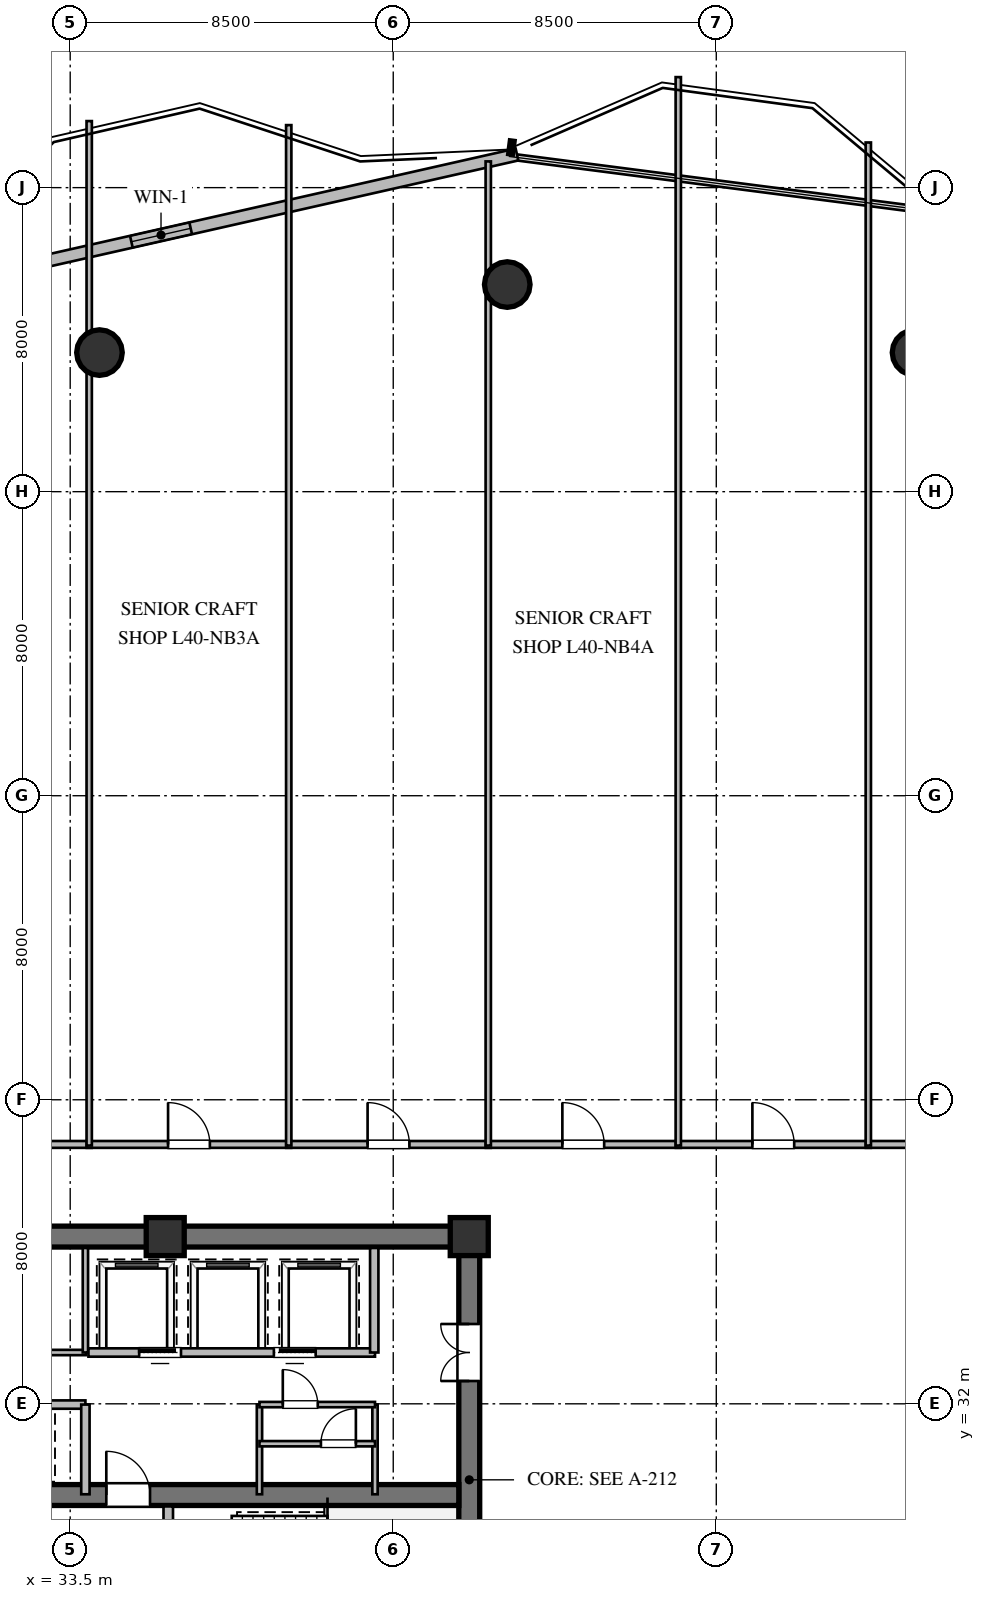
"""IFC4 building model, lengths in metres.
Left out: names, types, materials, properties, quantities, classifications, styles, units other than length and angle.
Written with IfcOpenShell. Run it as: python <this file> out.ifc"""

import sys

from ifc_helpers import new_model, si_unit, direction, frame, frame_2d, origin, origin_2d, place, context, subcontext, project, spatial, rectangle, circle, extrude, element, fill, save


model = new_model("IFC4")
c1 = context("Model", 3, precision=1e-05, world=origin(), true_north=direction((0.0, 1.0)))
c2 = subcontext(c1, "Body", "Model", "MODEL_VIEW")
j1 = project(units=[si_unit("LENGTHUNIT", "METRE"), si_unit("PLANEANGLEUNIT", "RADIAN")], contexts=[c1])
p1 = place(None, origin())
s1 = spatial("IfcSite", under=j1, at=p1, CompositionType="ELEMENT")
p2 = place(p1, origin())
s2 = spatial("IfcBuilding", under=s1, at=p2, CompositionType="ELEMENT")
p3 = place(p2, frame((0.0, 0.0, 153.0)))
s3 = spatial("IfcBuildingStorey", under=s2, at=p3, CompositionType="ELEMENT", Elevation=153.0)
p4 = place(p3, frame((21.725, 36.4, 0.0), z_axis=(0.0, 0.0, 1.0), x_axis=(1.0, 0.0, 0.0)))
e1 = element("IfcWall", 1, at=p4, inside=s3, PredefinedType="SHEAR", context=c2, shape_type="SweptSolid", body=[
    extrude(rectangle(XDim=22.55, YDim=0.55, at=frame_2d((11.275, 0.0))), origin(), (0.0, 0.0, 1.0), 3.36),
])
p5 = place(p3, frame((44.0, 23.875, 0.0), z_axis=(0.0, 0.0, 1.0), x_axis=(0.0, 1.0, 0.0)))
e2 = element("IfcWall", 2, at=p5, inside=s3, PredefinedType="SHEAR", context=c2, shape_type="SweptSolid", body=[
    extrude(rectangle(XDim=12.25, YDim=0.55, at=frame_2d((6.125, 0.0))), origin(), (0.0, 0.0, 1.0), 3.36),
])
p6 = place(p5, frame((8.725, 0.0, 0.0)))
e3 = element("IfcOpeningElement", 3, at=p6, cuts=e2, PredefinedType="OPENING", context=c2, shape_type="SweptSolid", body=[
    extrude(rectangle(XDim=1.5, YDim=2.15, at=frame_2d((0.75, 1.075))), frame((0.0, 0.285, 0.0), z_axis=(0.0, -1.0, 0.0), x_axis=(1.0, 0.0, 0.0)), (0.0, 0.0, 1.0), 0.57),
])
p7 = place(p3, frame((22.275, 29.6, 0.0), z_axis=(0.0, 0.0, 1.0), x_axis=(1.0, 0.0, 0.0)))
e4 = element("IfcWall", 4, at=p7, inside=s3, PredefinedType="SHEAR", context=c2, shape_type="SweptSolid", body=[
    extrude(rectangle(XDim=21.45, YDim=0.55, at=frame_2d((10.725, 0.0))), origin(), (0.0, 0.0, 1.0), 3.36),
])
p8 = place(p7, frame((12.175, 0.0, 0.0)))
e5 = element("IfcOpeningElement", 5, at=p8, cuts=e4, PredefinedType="OPENING", context=c2, shape_type="SweptSolid", body=[
    extrude(rectangle(XDim=1.15, YDim=2.1, at=frame_2d((0.575, 1.05))), frame((0.0, 0.285, 0.0), z_axis=(0.0, -1.0, 0.0), x_axis=(1.0, 0.0, 0.0)), (0.0, 0.0, 1.0), 0.57),
])
for number, where, z_axis, x_axis in (
    (6, (44.0, 36.4, 0.0), (0.0, 0.0, 1.0), (1.0, 0.0, 0.0)),
    (7, (36.0, 36.4, 0.0), (0.0, 0.0, 1.0), (1.0, 0.0, 0.0)),
):
    element("IfcColumn", number, at=place(p3, frame(where, z_axis=z_axis, x_axis=x_axis)), inside=s3, PredefinedType="COLUMN", context=c2, shape_type="SweptSolid", body=[
        extrude(rectangle(XDim=1.0, YDim=1.0, at=origin_2d()), origin(), (0.0, 0.0, 1.0), 3.6),
    ])
for number, where, z_axis, x_axis in (
    (8, (55.73, 59.66, 0.0), (0.0, 0.0, 1.0), (1.0, 0.0, 0.0)),
    (9, (45.0, 61.45, 0.0), (0.0, 0.0, 1.0), (1.0, 0.0, 0.0)),
    (10, (34.27, 59.66, 0.0), (0.0, 0.0, 1.0), (1.0, 0.0, 0.0)),
):
    element("IfcColumn", number, at=place(p3, frame(where, z_axis=z_axis, x_axis=x_axis)), inside=s3, PredefinedType="COLUMN", context=c2, shape_type="SweptSolid", body=[
        extrude(circle(Radius=0.6, at=origin_2d()), origin(), (0.0, 0.0, 1.0), 3.6),
    ])
p9 = place(p3, frame((26.525, 60.635, 0.0), z_axis=(0.0, 0.0, 1.0), x_axis=(0.975368700272, 0.220580820855, 0.0)))
e11 = element("IfcWall", 11, at=p9, inside=s3, PredefinedType="STANDARD", context=c2, shape_type="SweptSolid", body=[
    extrude(rectangle(XDim=19.204, YDim=0.32, at=frame_2d((9.602, 0.0))), origin(), (0.0, 0.0, 1.0), 3.36),
])
p10 = place(p9, frame((8.801, 0.0, 1.05)))
e12 = element("IfcOpeningElement", 12, at=p10, cuts=e11, PredefinedType="OPENING", context=c2, shape_type="SweptSolid", body=[
    extrude(rectangle(XDim=1.6, YDim=1.5, at=frame_2d((0.8, 0.75))), frame((0.0, 0.17, 0.0), z_axis=(0.0, -1.0, 0.0), x_axis=(1.0, 0.0, 0.0)), (0.0, 0.0, 1.0), 0.34),
])
p11 = place(p3, frame((36.08, 23.9, 0.0), z_axis=(0.0, 0.0, 1.0), x_axis=(0.0, 1.0, 0.0)))
e13 = element("IfcWall", 13, at=p11, inside=s3, PredefinedType="SOLIDWALL", context=c2, shape_type="SweptSolid", body=[
    extrude(rectangle(XDim=5.4, YDim=0.25, at=frame_2d((2.7, 0.0))), origin(), (0.0, 0.0, 1.0), 3.36),
])
p12 = place(p11, frame((3.421, 0.0, 0.0)))
e14 = element("IfcOpeningElement", 14, at=p12, cuts=e13, PredefinedType="OPENING", context=c2, shape_type="SweptSolid", body=[
    extrude(rectangle(XDim=1.15, YDim=2.1, at=frame_2d((0.575, 1.05))), frame((0.0, 0.135, 0.0), z_axis=(0.0, -1.0, 0.0), x_axis=(1.0, 0.0, 0.0)), (0.0, 0.0, 1.0), 0.27),
])
p13 = place(p3, frame((26.1, 31.98, 0.0), z_axis=(0.0, 0.0, 1.0), x_axis=(1.0, 0.0, 0.0)))
e15 = element("IfcWall", 15, at=p13, inside=s3, PredefinedType="SOLIDWALL", context=c2, shape_type="SweptSolid", body=[
    extrude(rectangle(XDim=7.8, YDim=0.22, at=frame_2d((3.9, 0.0))), origin(), (0.0, 0.0, 1.0), 3.36),
])
p14 = place(p3, frame((33.9, 29.62, 0.0), z_axis=(0.0, 0.0, 1.0), x_axis=(0.0, 1.0, 0.0)))
e16 = element("IfcWall", 16, at=p14, inside=s3, PredefinedType="SOLIDWALL", context=c2, shape_type="SweptSolid", body=[
    extrude(rectangle(XDim=2.36, YDim=0.22, at=frame_2d((1.18, 0.0))), origin(), (0.0, 0.0, 1.0), 3.36),
])
p15 = place(p3, frame((30.0, 33.35, 0.0), z_axis=(0.0, 0.0, 1.0), x_axis=(1.0, 0.0, 0.0)))
e17 = element("IfcWall", 17, at=p15, inside=s3, PredefinedType="PARTITIONING", context=c2, shape_type="SweptSolid", body=[
    extrude(rectangle(XDim=3.92, YDim=0.14, at=frame_2d((1.96, 0.0))), origin(), (0.0, 0.0, 1.0), 3.36),
])
p16 = place(p15, frame((1.5, 0.0, 0.0)))
e18 = element("IfcOpeningElement", 18, at=p16, cuts=e17, PredefinedType="OPENING", context=c2, shape_type="SweptSolid", body=[
    extrude(rectangle(XDim=0.92, YDim=2.1, at=frame_2d((0.46, 1.05))), frame((0.0, 0.08, 0.0), z_axis=(0.0, -1.0, 0.0), x_axis=(1.0, 0.0, 0.0)), (0.0, 0.0, 1.0), 0.16),
])
p17 = place(p3, frame((33.9, 33.35, 0.0), z_axis=(0.0, 0.0, 1.0), x_axis=(0.0, 1.0, 0.0)))
e19 = element("IfcWall", 19, at=p17, inside=s3, PredefinedType="PARTITIONING", context=c2, shape_type="SweptSolid", body=[
    extrude(rectangle(XDim=2.75, YDim=0.14, at=frame_2d((1.375, 0.0))), origin(), (0.0, 0.0, 1.0), 3.36),
])
p18 = place(p3, frame((33.98, 33.35, 0.0), z_axis=(0.0, 0.0, 1.0), x_axis=(1.0, 0.0, 0.0)))
e20 = element("IfcWall", 20, at=p18, inside=s3, PredefinedType="SOLIDWALL", context=c2, shape_type="SweptSolid", body=[
    extrude(rectangle(XDim=7.54, YDim=0.22, at=frame_2d((3.77, 0.0))), origin(), (0.0, 0.0, 1.0), 3.36),
])
p19 = place(p18, frame((1.335, 0.0, 0.0)))
e21 = element("IfcOpeningElement", 21, at=p19, cuts=e20, PredefinedType="OPENING", context=c2, shape_type="SweptSolid", body=[
    extrude(rectangle(XDim=1.1, YDim=2.1, at=frame_2d((0.55, 1.05))), frame((0.0, 0.12, 0.0), z_axis=(0.0, -1.0, 0.0), x_axis=(1.0, 0.0, 0.0)), (0.0, 0.0, 1.0), 0.24),
])
p20 = place(p18, frame((4.879, 0.0, 0.0)))
e22 = element("IfcOpeningElement", 22, at=p20, cuts=e20, PredefinedType="OPENING", context=c2, shape_type="SweptSolid", body=[
    extrude(rectangle(XDim=1.1, YDim=2.1, at=frame_2d((0.55, 1.05))), frame((0.0, 0.12, 0.0), z_axis=(0.0, -1.0, 0.0), x_axis=(1.0, 0.0, 0.0)), (0.0, 0.0, 1.0), 0.24),
])
p21 = place(p3, frame((41.5, 33.35, 0.0), z_axis=(0.0, 0.0, 1.0), x_axis=(0.0, 1.0, 0.0)))
e23 = element("IfcWall", 23, at=p21, inside=s3, PredefinedType="SOLIDWALL", context=c2, shape_type="SweptSolid", body=[
    extrude(rectangle(XDim=2.75, YDim=0.22, at=frame_2d((1.375, 0.0))), origin(), (0.0, 0.0, 1.0), 3.36),
])
for number, where, z_axis, x_axis in (
    (24, (38.48, 29.62, 0.0), (0.0, 0.0, 1.0), (0.0, 1.0, 0.0)),
    (25, (41.52, 29.62, 0.0), (0.0, 0.0, 1.0), (0.0, 1.0, 0.0)),
):
    element("IfcWall", number, at=place(p3, frame(where, z_axis=z_axis, x_axis=x_axis)), inside=s3, PredefinedType="PARTITIONING", context=c2, shape_type="SweptSolid", body=[
        extrude(rectangle(XDim=2.36, YDim=0.14, at=frame_2d((1.18, 0.0))), origin(), (0.0, 0.0, 1.0), 3.36),
    ])
p22 = place(p3, frame((38.48, 30.95, 0.0), z_axis=(0.0, 0.0, 1.0), x_axis=(1.0, 0.0, 0.0)))
e26 = element("IfcWall", 26, at=p22, inside=s3, PredefinedType="PARTITIONING", context=c2, shape_type="SweptSolid", body=[
    extrude(rectangle(XDim=3.04, YDim=0.14, at=frame_2d((1.52, 0.0))), origin(), (0.0, 0.0, 1.0), 3.36),
])
p23 = place(p22, frame((1.617, 0.0, 0.0)))
e27 = element("IfcOpeningElement", 27, at=p23, cuts=e26, PredefinedType="OPENING", context=c2, shape_type="SweptSolid", body=[
    extrude(rectangle(XDim=0.92, YDim=2.1, at=frame_2d((0.46, 1.05))), frame((0.0, 0.08, 0.0), z_axis=(0.0, -1.0, 0.0), x_axis=(1.0, 0.0, 0.0)), (0.0, 0.0, 1.0), 0.16),
])
p24 = place(p3, frame((38.48, 31.98, 0.0), z_axis=(0.0, 0.0, 1.0), x_axis=(1.0, 0.0, 0.0)))
e28 = element("IfcWall", 28, at=p24, inside=s3, PredefinedType="PARTITIONING", context=c2, shape_type="SweptSolid", body=[
    extrude(rectangle(XDim=3.04, YDim=0.14, at=frame_2d((1.52, 0.0))), origin(), (0.0, 0.0, 1.0), 3.36),
])
p25 = place(p24, frame((0.614, 0.0, 0.0)))
e29 = element("IfcOpeningElement", 29, at=p25, cuts=e28, PredefinedType="OPENING", context=c2, shape_type="SweptSolid", body=[
    extrude(rectangle(XDim=0.92, YDim=2.1, at=frame_2d((0.46, 1.05))), frame((0.0, 0.08, 0.0), z_axis=(0.0, -1.0, 0.0), x_axis=(1.0, 0.0, 0.0)), (0.0, 0.0, 1.0), 0.16),
])
p26 = place(p3, frame((28.935, 38.825, 0.0), z_axis=(0.0, 0.0, 1.0), x_axis=(1.0, 0.0, 0.0)))
e30 = element("IfcWall", 30, at=p26, inside=s3, PredefinedType="PARTITIONING", context=c2, shape_type="SweptSolid", body=[
    extrude(rectangle(XDim=5.13, YDim=0.18, at=frame_2d((2.565, 0.0))), origin(), (0.0, 0.0, 1.0), 3.36),
])
p27 = place(p26, frame((2.015, 0.0, 0.0)))
e31 = element("IfcOpeningElement", 31, at=p27, cuts=e30, PredefinedType="OPENING", context=c2, shape_type="SweptSolid", body=[
    extrude(rectangle(XDim=1.1, YDim=2.1, at=frame_2d((0.55, 1.05))), frame((0.0, 0.1, 0.0), z_axis=(0.0, -1.0, 0.0), x_axis=(1.0, 0.0, 0.0)), (0.0, 0.0, 1.0), 0.2),
])
p28 = place(p3, frame((33.935, 38.825, 0.0), z_axis=(0.0, 0.0, 1.0), x_axis=(1.0, 0.0, 0.0)))
e32 = element("IfcWall", 32, at=p28, inside=s3, PredefinedType="PARTITIONING", context=c2, shape_type="SweptSolid", body=[
    extrude(rectangle(XDim=5.38, YDim=0.18, at=frame_2d((2.69, 0.0))), origin(), (0.0, 0.0, 1.0), 3.36),
])
p29 = place(p28, frame((2.14, 0.0, 0.0)))
e33 = element("IfcOpeningElement", 33, at=p29, cuts=e32, PredefinedType="OPENING", context=c2, shape_type="SweptSolid", body=[
    extrude(rectangle(XDim=1.1, YDim=2.1, at=frame_2d((0.55, 1.05))), frame((0.0, 0.1, 0.0), z_axis=(0.0, -1.0, 0.0), x_axis=(1.0, 0.0, 0.0)), (0.0, 0.0, 1.0), 0.2),
])
p30 = place(p3, frame((39.185, 38.825, 0.0), z_axis=(0.0, 0.0, 1.0), x_axis=(1.0, 0.0, 0.0)))
e34 = element("IfcWall", 34, at=p30, inside=s3, PredefinedType="PARTITIONING", context=c2, shape_type="SweptSolid", body=[
    extrude(rectangle(XDim=5.38, YDim=0.18, at=frame_2d((2.69, 0.0))), origin(), (0.0, 0.0, 1.0), 3.36),
])
p31 = place(p30, frame((2.14, 0.0, 0.0)))
e35 = element("IfcOpeningElement", 35, at=p31, cuts=e34, PredefinedType="OPENING", context=c2, shape_type="SweptSolid", body=[
    extrude(rectangle(XDim=1.1, YDim=2.1, at=frame_2d((0.55, 1.05))), frame((0.0, 0.1, 0.0), z_axis=(0.0, -1.0, 0.0), x_axis=(1.0, 0.0, 0.0)), (0.0, 0.0, 1.0), 0.2),
])
p32 = place(p3, frame((44.435, 38.825, 0.0), z_axis=(0.0, 0.0, 1.0), x_axis=(1.0, 0.0, 0.0)))
e36 = element("IfcWall", 36, at=p32, inside=s3, PredefinedType="PARTITIONING", context=c2, shape_type="SweptSolid", body=[
    extrude(rectangle(XDim=5.13, YDim=0.18, at=frame_2d((2.565, 0.0))), origin(), (0.0, 0.0, 1.0), 3.36),
])
p33 = place(p32, frame((2.015, 0.0, 0.0)))
e37 = element("IfcOpeningElement", 37, at=p33, cuts=e36, PredefinedType="OPENING", context=c2, shape_type="SweptSolid", body=[
    extrude(rectangle(XDim=1.1, YDim=2.1, at=frame_2d((0.55, 1.05))), frame((0.0, 0.1, 0.0), z_axis=(0.0, -1.0, 0.0), x_axis=(1.0, 0.0, 0.0)), (0.0, 0.0, 1.0), 0.2),
])
p34 = place(p3, frame((49.435, 38.825, 0.0), z_axis=(0.0, 0.0, 1.0), x_axis=(1.0, 0.0, 0.0)))
e38 = element("IfcWall", 38, at=p34, inside=s3, PredefinedType="PARTITIONING", context=c2, shape_type="SweptSolid", body=[
    extrude(rectangle(XDim=5.13, YDim=0.18, at=frame_2d((2.565, 0.0))), origin(), (0.0, 0.0, 1.0), 3.36),
])
p35 = place(p34, frame((2.015, 0.0, 0.0)))
e39 = element("IfcOpeningElement", 39, at=p35, cuts=e38, PredefinedType="OPENING", context=c2, shape_type="SweptSolid", body=[
    extrude(rectangle(XDim=1.1, YDim=2.1, at=frame_2d((0.55, 1.05))), frame((0.0, 0.1, 0.0), z_axis=(0.0, -1.0, 0.0), x_axis=(1.0, 0.0, 0.0)), (0.0, 0.0, 1.0), 0.2),
])
p36 = place(p3, frame((54.435, 38.825, 0.0), z_axis=(0.0, 0.0, 1.0), x_axis=(1.0, 0.0, 0.0)))
e40 = element("IfcWall", 40, at=p36, inside=s3, PredefinedType="PARTITIONING", context=c2, shape_type="SweptSolid", body=[
    extrude(rectangle(XDim=14.095, YDim=0.18, at=frame_2d((7.047, 0.0))), origin(), (0.0, 0.0, 1.0), 3.36),
])
p37 = place(p36, frame((6.498, 0.0, 0.0)))
e41 = element("IfcOpeningElement", 41, at=p37, cuts=e40, PredefinedType="OPENING", context=c2, shape_type="SweptSolid", body=[
    extrude(rectangle(XDim=1.1, YDim=2.1, at=frame_2d((0.55, 1.05))), frame((0.0, 0.1, 0.0), z_axis=(0.0, -1.0, 0.0), x_axis=(1.0, 0.0, 0.0)), (0.0, 0.0, 1.0), 0.2),
])
p38 = place(p3, frame((34.0, 65.751, 0.0), z_axis=(0.0, 0.0, 1.0), x_axis=(0.0, -1.0, 0.0)))
e42 = element("IfcWall", 42, at=p38, inside=s3, PredefinedType="PARTITIONING", context=c2, shape_type="SweptSolid", body=[
    extrude(rectangle(XDim=26.956, YDim=0.14, at=frame_2d((13.478, 0.0))), origin(), (0.0, 0.0, 1.0), 2.806),
])
p39 = place(p3, frame((39.25, 65.645, 0.0), z_axis=(0.0, 0.0, 1.0), x_axis=(0.0, -1.0, 0.0)))
e43 = element("IfcWall", 43, at=p39, inside=s3, PredefinedType="PARTITIONING", context=c2, shape_type="SweptSolid", body=[
    extrude(rectangle(XDim=26.85, YDim=0.14, at=frame_2d((13.425, 0.0))), origin(), (0.0, 0.0, 1.0), 3.36),
])
p40 = place(p3, frame((44.5, 64.69, 0.0), z_axis=(0.0, 0.0, 1.0), x_axis=(0.0, -1.0, 0.0)))
e44 = element("IfcWall", 44, at=p40, inside=s3, PredefinedType="PARTITIONING", context=c2, shape_type="SweptSolid", body=[
    extrude(rectangle(XDim=25.895, YDim=0.14, at=frame_2d((12.948, 0.0))), origin(), (0.0, 0.0, 1.0), 2.806),
])
p41 = place(p3, frame((49.5, 66.908, 0.0), z_axis=(0.0, 0.0, 1.0), x_axis=(0.0, -1.0, 0.0)))
e45 = element("IfcWall", 45, at=p41, inside=s3, PredefinedType="PARTITIONING", context=c2, shape_type="SweptSolid", body=[
    extrude(rectangle(XDim=28.113, YDim=0.14, at=frame_2d((14.057, 0.0))), origin(), (0.0, 0.0, 1.0), 3.36),
])
p42 = place(p3, frame((54.5, 65.188, 0.0), z_axis=(0.0, 0.0, 1.0), x_axis=(0.0, -1.0, 0.0)))
e46 = element("IfcWall", 46, at=p42, inside=s3, PredefinedType="PARTITIONING", context=c2, shape_type="SweptSolid", body=[
    extrude(rectangle(XDim=26.393, YDim=0.14, at=frame_2d((13.197, 0.0))), origin(), (0.0, 0.0, 1.0), 3.36),
])
p43 = place(p10, origin())
e47 = element("IfcWindow", 47, at=p43, inside=s3, PartitioningType="SINGLE_PANEL", PredefinedType="WINDOW", context=c2, shape_type="SweptSolid", body=[
    extrude(rectangle(XDim=1.6, YDim=1.5, at=frame_2d((0.8, 0.75))), frame((0.0, 0.03, 0.0), z_axis=(0.0, -1.0, 0.0), x_axis=(1.0, 0.0, 0.0)), (0.0, 0.0, 1.0), 0.06),
])
fill(e12, e47)
p44 = place(p8, origin())
e48 = element("IfcDoor", 48, at=p44, inside=s3, OperationType="SINGLE_SWING_LEFT", PredefinedType="DOOR", context=c2, shape_type="SweptSolid", body=[
    extrude(rectangle(XDim=1.15, YDim=2.1, at=frame_2d((0.575, 1.05))), frame((0.0, 0.025, 0.0), z_axis=(0.0, -1.0, 0.0), x_axis=(1.0, 0.0, 0.0)), (0.0, 0.0, 1.0), 0.05),
])
fill(e5, e48)
p45 = place(p6, origin())
e49 = element("IfcDoor", 49, at=p45, inside=s3, OperationType="DOUBLE_DOOR_SINGLE_SWING", PredefinedType="DOOR", context=c2, shape_type="SweptSolid", body=[
    extrude(rectangle(XDim=1.5, YDim=2.15, at=frame_2d((0.75, 1.075))), frame((0.0, 0.025, 0.0), z_axis=(0.0, -1.0, 0.0), x_axis=(1.0, 0.0, 0.0)), (0.0, 0.0, 1.0), 0.05),
])
fill(e3, e49)
p46 = place(p19, origin())
e50 = element("IfcDoor", 50, at=p46, inside=s3, OperationType="SLIDING_TO_LEFT", PredefinedType="DOOR", context=c2, shape_type="SweptSolid", body=[
    extrude(rectangle(XDim=1.1, YDim=2.1, at=frame_2d((0.55, 1.05))), frame((0.0, 0.025, 0.0), z_axis=(0.0, -1.0, 0.0), x_axis=(1.0, 0.0, 0.0)), (0.0, 0.0, 1.0), 0.05),
])
fill(e21, e50)
p47 = place(p20, origin())
e51 = element("IfcDoor", 51, at=p47, inside=s3, OperationType="SLIDING_TO_RIGHT", PredefinedType="DOOR", context=c2, shape_type="SweptSolid", body=[
    extrude(rectangle(XDim=1.1, YDim=2.1, at=frame_2d((0.55, 1.05))), frame((0.0, 0.025, 0.0), z_axis=(0.0, -1.0, 0.0), x_axis=(1.0, 0.0, 0.0)), (0.0, 0.0, 1.0), 0.05),
])
fill(e22, e51)
p48 = place(p25, origin())
e52 = element("IfcDoor", 52, at=p48, inside=s3, OperationType="SINGLE_SWING_LEFT", PredefinedType="DOOR", context=c2, shape_type="SweptSolid", body=[
    extrude(rectangle(XDim=0.92, YDim=2.1, at=frame_2d((0.46, 1.05))), frame((0.0, 0.025, 0.0), z_axis=(0.0, -1.0, 0.0), x_axis=(1.0, 0.0, 0.0)), (0.0, 0.0, 1.0), 0.05),
])
fill(e29, e52)
p49 = place(p23, origin())
e53 = element("IfcDoor", 53, at=p49, inside=s3, OperationType="SINGLE_SWING_RIGHT", PredefinedType="DOOR", context=c2, shape_type="SweptSolid", body=[
    extrude(rectangle(XDim=0.92, YDim=2.1, at=frame_2d((0.46, 1.05))), frame((0.0, 0.025, 0.0), z_axis=(0.0, -1.0, 0.0), x_axis=(1.0, 0.0, 0.0)), (0.0, 0.0, 1.0), 0.05),
])
fill(e27, e53)
p50 = place(p29, origin())
e54 = element("IfcDoor", 54, at=p50, inside=s3, OperationType="SINGLE_SWING_LEFT", PredefinedType="DOOR", context=c2, shape_type="SweptSolid", body=[
    extrude(rectangle(XDim=1.1, YDim=2.1, at=frame_2d((0.55, 1.05))), frame((0.0, 0.025, 0.0), z_axis=(0.0, -1.0, 0.0), x_axis=(1.0, 0.0, 0.0)), (0.0, 0.0, 1.0), 0.05),
])
fill(e33, e54)
p51 = place(p31, origin())
e55 = element("IfcDoor", 55, at=p51, inside=s3, OperationType="SINGLE_SWING_LEFT", PredefinedType="DOOR", context=c2, shape_type="SweptSolid", body=[
    extrude(rectangle(XDim=1.1, YDim=2.1, at=frame_2d((0.55, 1.05))), frame((0.0, 0.025, 0.0), z_axis=(0.0, -1.0, 0.0), x_axis=(1.0, 0.0, 0.0)), (0.0, 0.0, 1.0), 0.05),
])
fill(e35, e55)
p52 = place(p33, origin())
e56 = element("IfcDoor", 56, at=p52, inside=s3, OperationType="SINGLE_SWING_LEFT", PredefinedType="DOOR", context=c2, shape_type="SweptSolid", body=[
    extrude(rectangle(XDim=1.1, YDim=2.1, at=frame_2d((0.55, 1.05))), frame((0.0, 0.025, 0.0), z_axis=(0.0, -1.0, 0.0), x_axis=(1.0, 0.0, 0.0)), (0.0, 0.0, 1.0), 0.05),
])
fill(e37, e56)
p53 = place(p35, origin())
e57 = element("IfcDoor", 57, at=p53, inside=s3, OperationType="SINGLE_SWING_LEFT", PredefinedType="DOOR", context=c2, shape_type="SweptSolid", body=[
    extrude(rectangle(XDim=1.1, YDim=2.1, at=frame_2d((0.55, 1.05))), frame((0.0, 0.025, 0.0), z_axis=(0.0, -1.0, 0.0), x_axis=(1.0, 0.0, 0.0)), (0.0, 0.0, 1.0), 0.05),
])
fill(e39, e57)
save(model, sys.argv[1])
